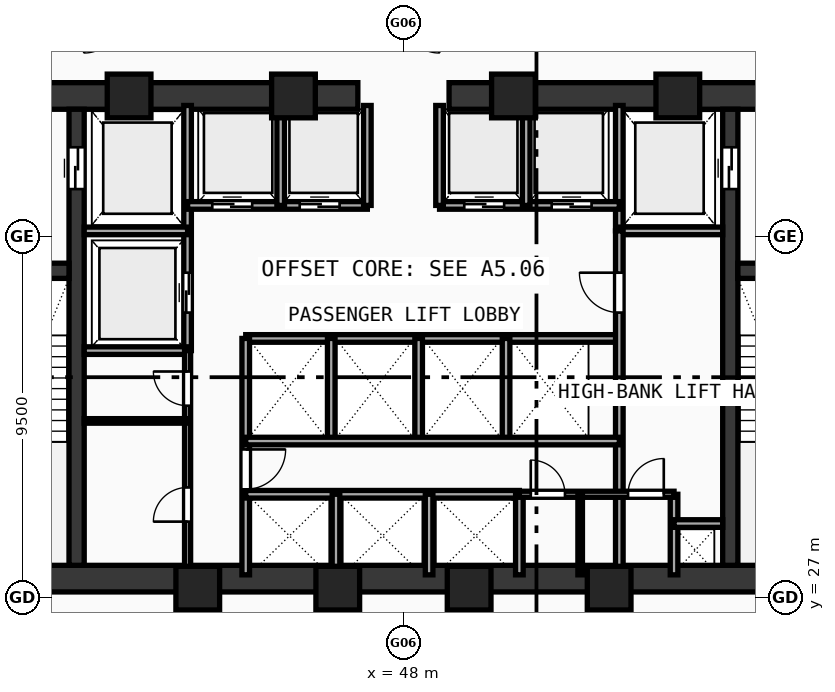
"""IFC4 building model, lengths in metres.
Left out: names, types, materials, properties, quantities, classifications, styles, units other than length and angle.
Written with IfcOpenShell. Run it as: python <this file> out.ifc"""

import sys

from ifc_helpers import new_model, si_unit, direction, frame, frame_2d, origin, origin_with_axes, origin_2d, place, context, subcontext, project, spatial, rectangle, hollow_rectangle, extrude, source, transform, mapped, element, fill, save


model = new_model("IFC4")
c1 = context("Model", 3, precision=1e-05, world=origin(), true_north=direction((0.0, 1.0)))
c2 = subcontext(c1, "Body", "Model", "MODEL_VIEW")
j1 = project(units=[si_unit("LENGTHUNIT", "METRE"), si_unit("PLANEANGLEUNIT", "RADIAN")], contexts=[c1])
p1 = place(None, origin())
s1 = spatial("IfcSite", under=j1, at=p1, CompositionType="ELEMENT")
p2 = place(p1, origin())
s2 = spatial("IfcBuilding", under=s1, at=p2, CompositionType="ELEMENT")
p3 = place(p2, frame((0.0, 0.0, 66.7)))
s3 = spatial("IfcBuildingStorey", under=s2, at=p3, CompositionType="ELEMENT", Elevation=66.7)
p4 = place(p3, frame((35.45, 27.5, 0.0), z_axis=(0.0, 0.0, 1.0), x_axis=(1.0, 0.0, 0.0)))
e1 = element("IfcWall", 1, at=p4, inside=s3, PredefinedType="SHEAR", context=c2, shape_type="SweptSolid", body=[
    extrude(rectangle(XDim=25.1, YDim=0.7, at=frame_2d((12.55, 0.0))), origin(), (0.0, 0.0, 1.0), 3.37),
])
p5 = place(p3, frame((35.45, 40.2, 0.0), z_axis=(0.0, 0.0, 1.0), x_axis=(1.0, 0.0, 0.0)))
e2 = element("IfcWall", 2, at=p5, inside=s3, PredefinedType="SHEAR", context=c2, shape_type="SweptSolid", body=[
    extrude(rectangle(XDim=11.35, YDim=0.7, at=frame_2d((5.675, 0.0))), origin(), (0.0, 0.0, 1.0), 3.37),
])
p6 = place(p5, frame((1.7, 0.0, 0.0)))
e3 = element("IfcOpeningElement", 3, at=p6, cuts=e2, PredefinedType="OPENING", context=c2, shape_type="SweptSolid", body=[
    extrude(rectangle(XDim=1.05, YDim=2.1, at=frame_2d((0.525, 1.05))), frame((0.0, 0.36, 0.0), z_axis=(0.0, -1.0, 0.0), x_axis=(1.0, 0.0, 0.0)), (0.0, 0.0, 1.0), 0.72),
])
p7 = place(p3, frame((49.2, 40.2, 0.0), z_axis=(0.0, 0.0, 1.0), x_axis=(1.0, 0.0, 0.0)))
e4 = element("IfcWall", 4, at=p7, inside=s3, PredefinedType="SHEAR", context=c2, shape_type="SweptSolid", body=[
    extrude(rectangle(XDim=11.35, YDim=0.7, at=frame_2d((5.675, 0.0))), origin(), (0.0, 0.0, 1.0), 3.37),
])
p8 = place(p7, frame((8.6, 0.0, 0.0)))
e5 = element("IfcOpeningElement", 5, at=p8, cuts=e4, PredefinedType="OPENING", context=c2, shape_type="SweptSolid", body=[
    extrude(rectangle(XDim=1.05, YDim=2.1, at=frame_2d((0.525, 1.05))), frame((0.0, 0.36, 0.0), z_axis=(0.0, -1.0, 0.0), x_axis=(1.0, 0.0, 0.0)), (0.0, 0.0, 1.0), 0.72),
])
p9 = place(p3, frame((39.4, 27.85, 0.0), z_axis=(0.0, 0.0, 1.0), x_axis=(0.0, 1.0, 0.0)))
e6 = element("IfcWall", 6, at=p9, inside=s3, PredefinedType="SHEAR", context=c2, shape_type="SweptSolid", body=[
    extrude(rectangle(XDim=12.0, YDim=0.4, at=frame_2d((6.0, 0.0))), origin(), (0.0, 0.0, 1.0), 3.37),
])
p10 = place(p9, frame((9.9, 0.0, 0.0)))
e7 = element("IfcOpeningElement", 7, at=p10, cuts=e6, PredefinedType="OPENING", context=c2, shape_type="SweptSolid", body=[
    extrude(rectangle(XDim=1.1, YDim=2.1, at=frame_2d((0.55, 1.05))), frame((0.0, 0.21, 0.0), z_axis=(0.0, -1.0, 0.0), x_axis=(1.0, 0.0, 0.0)), (0.0, 0.0, 1.0), 0.42),
])
p11 = place(p3, frame((56.6, 27.85, 0.0), z_axis=(0.0, 0.0, 1.0), x_axis=(0.0, 1.0, 0.0)))
e8 = element("IfcWall", 8, at=p11, inside=s3, PredefinedType="SHEAR", context=c2, shape_type="SweptSolid", body=[
    extrude(rectangle(XDim=12.0, YDim=0.4, at=frame_2d((6.0, 0.0))), origin(), (0.0, 0.0, 1.0), 3.37),
])
p12 = place(p11, frame((9.9, 0.0, 0.0)))
e9 = element("IfcOpeningElement", 9, at=p12, cuts=e8, PredefinedType="OPENING", context=c2, shape_type="SweptSolid", body=[
    extrude(rectangle(XDim=1.1, YDim=2.1, at=frame_2d((0.55, 1.05))), frame((0.0, 0.21, 0.0), z_axis=(0.0, -1.0, 0.0), x_axis=(1.0, 0.0, 0.0)), (0.0, 0.0, 1.0), 0.42),
])
p13 = place(p3, frame((36.15, 35.6, 0.0), z_axis=(0.0, 0.0, 1.0), x_axis=(1.0, 0.0, 0.0)))
e10 = element("IfcWall", 10, at=p13, inside=s3, PredefinedType="SHEAR", context=c2, shape_type="SweptSolid", body=[
    extrude(rectangle(XDim=3.05, YDim=0.4, at=frame_2d((1.525, 0.0))), origin(), (0.0, 0.0, 1.0), 3.37),
])
p14 = place(p13, frame((0.97, 0.0, 0.0)))
e11 = element("IfcOpeningElement", 11, at=p14, cuts=e10, PredefinedType="OPENING", context=c2, shape_type="SweptSolid", body=[
    extrude(rectangle(XDim=1.05, YDim=2.1, at=frame_2d((0.525, 1.05))), frame((0.0, 0.21, 0.0), z_axis=(0.0, -1.0, 0.0), x_axis=(1.0, 0.0, 0.0)), (0.0, 0.0, 1.0), 0.42),
])
p15 = place(p3, frame((56.8, 35.6, 0.0), z_axis=(0.0, 0.0, 1.0), x_axis=(1.0, 0.0, 0.0)))
e12 = element("IfcWall", 12, at=p15, inside=s3, PredefinedType="SHEAR", context=c2, shape_type="SweptSolid", body=[
    extrude(rectangle(XDim=3.05, YDim=0.4, at=frame_2d((1.525, 0.0))), origin(), (0.0, 0.0, 1.0), 3.37),
])
p16 = place(p15, frame((1.02, 0.0, 0.0)))
e13 = element("IfcOpeningElement", 13, at=p16, cuts=e12, PredefinedType="OPENING", context=c2, shape_type="SweptSolid", body=[
    extrude(rectangle(XDim=1.05, YDim=2.1, at=frame_2d((0.525, 1.05))), frame((0.0, 0.21, 0.0), z_axis=(0.0, -1.0, 0.0), x_axis=(1.0, 0.0, 0.0)), (0.0, 0.0, 1.0), 0.42),
])
m1 = source(origin(), c2, "Body", "SweptSolid", [
    extrude(hollow_rectangle(XDim=1.15, YDim=1.15, WallThickness=0.048, at=origin_2d()), origin(), (0.0, 0.0, 1.0), 3.63),
])
for number, where, z_axis, x_axis in (
    (14, (42.588, 27.25, -0.26), (0.0, 0.0, 1.0), (1.0, 0.0, 0.0)),
    (15, (46.272, 27.25, -0.26), (0.0, 0.0, 1.0), (1.0, 0.0, 0.0)),
    (16, (49.729, 27.25, -0.26), (0.0, 0.0, 1.0), (1.0, 0.0, 0.0)),
    (17, (53.412, 27.25, -0.26), (0.0, 0.0, 1.0), (1.0, 0.0, 0.0)),
    (18, (55.219, 40.2, -0.26), (0.0, 0.0, 1.0), (1.0, 0.0, 0.0)),
    (19, (50.894, 40.2, -0.26), (0.0, 0.0, 1.0), (1.0, 0.0, 0.0)),
    (20, (45.106, 40.2, -0.26), (0.0, 0.0, 1.0), (1.0, 0.0, 0.0)),
    (21, (40.781, 40.2, -0.26), (0.0, 0.0, 1.0), (1.0, 0.0, 0.0)),
):
    element("IfcColumn", number, at=place(p3, frame(where, z_axis=z_axis, x_axis=x_axis)), inside=s3, PredefinedType="COLUMN", context=c2, shape_type="MappedRepresentation", body=[
        mapped(m1, transform((0.0, 0.0, 0.0), scale=1.0)),
    ])
p17 = place(p3, frame((42.32, 33.5, 0.0), z_axis=(0.0, 0.0, 1.0), x_axis=(0.0, 1.0, 0.0)))
e22 = element("IfcWall", 22, at=p17, inside=s3, PredefinedType="SOLIDWALL", context=c2, shape_type="SweptSolid", body=[
    extrude(rectangle(XDim=6.45, YDim=0.2, at=frame_2d((3.225, 0.0))), origin(), (0.0, 0.0, 1.0), 3.37),
])
p18 = place(p17, frame((1.0, 0.0, 0.0)))
e23 = element("IfcOpeningElement", 23, at=p18, cuts=e22, PredefinedType="OPENING", context=c2, shape_type="SweptSolid", body=[
    extrude(rectangle(XDim=1.05, YDim=2.1, at=frame_2d((0.525, 1.05))), frame((0.0, 0.11, 0.0), z_axis=(0.0, -1.0, 0.0), x_axis=(1.0, 0.0, 0.0)), (0.0, 0.0, 1.0), 0.22),
])
for number, where, z_axis, x_axis in (
    (24, (39.6, 36.65, 0.0), (0.0, 0.0, 1.0), (1.0, 0.0, 0.0)),
    (25, (39.6, 33.5, 0.0), (0.0, 0.0, 1.0), (1.0, 0.0, 0.0)),
):
    element("IfcWall", number, at=place(p3, frame(where, z_axis=z_axis, x_axis=x_axis)), inside=s3, PredefinedType="SOLIDWALL", context=c2, shape_type="SweptSolid", body=[
        extrude(rectangle(XDim=2.72, YDim=0.2, at=frame_2d((1.36, 0.0))), origin(), (0.0, 0.0, 1.0), 3.37),
    ])
p19 = place(p3, frame((53.68, 36.65, 0.0), z_axis=(0.0, 0.0, 1.0), x_axis=(0.0, 1.0, 0.0)))
e26 = element("IfcWall", 26, at=p19, inside=s3, PredefinedType="SOLIDWALL", context=c2, shape_type="SweptSolid", body=[
    extrude(rectangle(XDim=3.3, YDim=0.2, at=frame_2d((1.65, 0.0))), origin(), (0.0, 0.0, 1.0), 3.37),
])
p20 = place(p3, frame((53.68, 36.65, 0.0), z_axis=(0.0, 0.0, 1.0), x_axis=(1.0, 0.0, 0.0)))
e27 = element("IfcWall", 27, at=p20, inside=s3, PredefinedType="SOLIDWALL", context=c2, shape_type="SweptSolid", body=[
    extrude(rectangle(XDim=2.72, YDim=0.2, at=frame_2d((1.36, 0.0))), origin(), (0.0, 0.0, 1.0), 3.37),
])
p21 = place(p3, frame((42.32, 37.32, 0.0), z_axis=(0.0, 0.0, 1.0), x_axis=(1.0, 0.0, 0.0)))
e28 = element("IfcWall", 28, at=p21, inside=s3, PredefinedType="SOLIDWALL", context=c2, shape_type="SweptSolid", body=[
    extrude(rectangle(XDim=4.73, YDim=0.2, at=frame_2d((2.365, 0.0))), origin(), (0.0, 0.0, 1.0), 3.37),
])
p22 = place(p21, frame((0.65, 0.0, 0.0)))
e29 = element("IfcOpeningElement", 29, at=p22, cuts=e28, PredefinedType="OPENING", context=c2, shape_type="SweptSolid", body=[
    extrude(rectangle(XDim=1.05, YDim=2.1, at=frame_2d((0.525, 1.05))), frame((0.0, 0.11, 0.0), z_axis=(0.0, -1.0, 0.0), x_axis=(1.0, 0.0, 0.0)), (0.0, 0.0, 1.0), 0.22),
])
p23 = place(p21, frame((2.95, 0.0, 0.0)))
e30 = element("IfcOpeningElement", 30, at=p23, cuts=e28, PredefinedType="OPENING", context=c2, shape_type="SweptSolid", body=[
    extrude(rectangle(XDim=1.05, YDim=2.1, at=frame_2d((0.525, 1.05))), frame((0.0, 0.11, 0.0), z_axis=(0.0, -1.0, 0.0), x_axis=(1.0, 0.0, 0.0)), (0.0, 0.0, 1.0), 0.22),
])
p24 = place(p3, frame((48.95, 37.32, 0.0), z_axis=(0.0, 0.0, 1.0), x_axis=(1.0, 0.0, 0.0)))
e31 = element("IfcWall", 31, at=p24, inside=s3, PredefinedType="SOLIDWALL", context=c2, shape_type="SweptSolid", body=[
    extrude(rectangle(XDim=4.73, YDim=0.2, at=frame_2d((2.365, 0.0))), origin(), (0.0, 0.0, 1.0), 3.37),
])
p25 = place(p24, frame((0.65, 0.0, 0.0)))
e32 = element("IfcOpeningElement", 32, at=p25, cuts=e31, PredefinedType="OPENING", context=c2, shape_type="SweptSolid", body=[
    extrude(rectangle(XDim=1.05, YDim=2.1, at=frame_2d((0.525, 1.05))), frame((0.0, 0.11, 0.0), z_axis=(0.0, -1.0, 0.0), x_axis=(1.0, 0.0, 0.0)), (0.0, 0.0, 1.0), 0.22),
])
p26 = place(p24, frame((2.95, 0.0, 0.0)))
e33 = element("IfcOpeningElement", 33, at=p26, cuts=e31, PredefinedType="OPENING", context=c2, shape_type="SweptSolid", body=[
    extrude(rectangle(XDim=1.05, YDim=2.1, at=frame_2d((0.525, 1.05))), frame((0.0, 0.11, 0.0), z_axis=(0.0, -1.0, 0.0), x_axis=(1.0, 0.0, 0.0)), (0.0, 0.0, 1.0), 0.22),
])
for number, where, z_axis, x_axis in (
    (34, (47.05, 37.32, 0.0), (0.0, 0.0, 1.0), (0.0, 1.0, 0.0)),
    (35, (48.95, 37.32, 0.0), (0.0, 0.0, 1.0), (0.0, 1.0, 0.0)),
    (36, (44.77, 37.32, 0.0), (0.0, 0.0, 1.0), (0.0, 1.0, 0.0)),
    (37, (51.23, 37.32, 0.0), (0.0, 0.0, 1.0), (0.0, 1.0, 0.0)),
):
    element("IfcWall", number, at=place(p3, frame(where, z_axis=z_axis, x_axis=x_axis)), inside=s3, PredefinedType="SOLIDWALL", context=c2, shape_type="SweptSolid", body=[
        extrude(rectangle(XDim=2.63, YDim=0.2, at=frame_2d((1.315, 0.0))), origin(), (0.0, 0.0, 1.0), 3.37),
    ])
p27 = place(p3, frame((43.85, 33.82, 0.0), z_axis=(0.0, 0.0, 1.0), x_axis=(1.0, 0.0, 0.0)))
e38 = element("IfcWall", 38, at=p27, inside=s3, PredefinedType="SOLIDWALL", context=c2, shape_type="SweptSolid", body=[
    extrude(rectangle(XDim=9.83, YDim=0.2, at=frame_2d((4.915, 0.0))), origin(), (0.0, 0.0, 1.0), 3.37),
])
p28 = place(p3, frame((43.85, 27.6, 0.0), z_axis=(0.0, 0.0, 1.0), x_axis=(0.0, 1.0, 0.0)))
e39 = element("IfcWall", 39, at=p28, inside=s3, PredefinedType="SOLIDWALL", context=c2, shape_type="SweptSolid", body=[
    extrude(rectangle(XDim=6.22, YDim=0.2, at=frame_2d((3.11, 0.0))), origin(), (0.0, 0.0, 1.0), 3.37),
])
p29 = place(p28, frame((2.25, 0.0, 0.0)))
e40 = element("IfcOpeningElement", 40, at=p29, cuts=e39, PredefinedType="OPENING", context=c2, shape_type="SweptSolid", body=[
    extrude(rectangle(XDim=1.05, YDim=2.1, at=frame_2d((0.525, 1.05))), frame((0.0, 0.11, 0.0), z_axis=(0.0, -1.0, 0.0), x_axis=(1.0, 0.0, 0.0)), (0.0, 0.0, 1.0), 0.22),
])
p30 = place(p3, frame((53.68, 27.6, 0.0), z_axis=(0.0, 0.0, 1.0), x_axis=(0.0, 1.0, 0.0)))
e41 = element("IfcWall", 41, at=p30, inside=s3, PredefinedType="SOLIDWALL", context=c2, shape_type="SweptSolid", body=[
    extrude(rectangle(XDim=9.05, YDim=0.2, at=frame_2d((4.525, 0.0))), origin(), (0.0, 0.0, 1.0), 3.37),
])
p31 = place(p30, frame((6.9, 0.0, 0.0)))
e42 = element("IfcOpeningElement", 42, at=p31, cuts=e41, PredefinedType="OPENING", context=c2, shape_type="SweptSolid", body=[
    extrude(rectangle(XDim=1.05, YDim=2.1, at=frame_2d((0.525, 1.05))), frame((0.0, 0.11, 0.0), z_axis=(0.0, -1.0, 0.0), x_axis=(1.0, 0.0, 0.0)), (0.0, 0.0, 1.0), 0.22),
])
for number, where, z_axis, x_axis in (
    (43, (46.1, 31.12, 0.0), (0.0, 0.0, 1.0), (0.0, 1.0, 0.0)),
    (44, (48.4, 31.12, 0.0), (0.0, 0.0, 1.0), (0.0, 1.0, 0.0)),
    (45, (50.7, 31.12, 0.0), (0.0, 0.0, 1.0), (0.0, 1.0, 0.0)),
):
    element("IfcWall", number, at=place(p3, frame(where, z_axis=z_axis, x_axis=x_axis)), inside=s3, PredefinedType="SOLIDWALL", context=c2, shape_type="SweptSolid", body=[
        extrude(rectangle(XDim=2.7, YDim=0.2, at=frame_2d((1.35, 0.0))), origin(), (0.0, 0.0, 1.0), 3.37),
    ])
p32 = place(p3, frame((43.85, 29.72, 0.0), z_axis=(0.0, 0.0, 1.0), x_axis=(1.0, 0.0, 0.0)))
e46 = element("IfcWall", 46, at=p32, inside=s3, PredefinedType="SOLIDWALL", context=c2, shape_type="SweptSolid", body=[
    extrude(rectangle(XDim=7.2, YDim=0.2, at=frame_2d((3.6, 0.0))), origin(), (0.0, 0.0, 1.0), 3.37),
])
p33 = place(p3, frame((51.05, 27.6, 0.0), z_axis=(0.0, 0.0, 1.0), x_axis=(0.0, 1.0, 0.0)))
e47 = element("IfcWall", 47, at=p33, inside=s3, PredefinedType="SOLIDWALL", context=c2, shape_type="SweptSolid", body=[
    extrude(rectangle(XDim=2.12, YDim=0.2, at=frame_2d((1.06, 0.0))), origin(), (0.0, 0.0, 1.0), 3.37),
])
p34 = place(p3, frame((43.85, 31.12, 0.0), z_axis=(0.0, 0.0, 1.0), x_axis=(1.0, 0.0, 0.0)))
e48 = element("IfcWall", 48, at=p34, inside=s3, PredefinedType="SOLIDWALL", context=c2, shape_type="SweptSolid", body=[
    extrude(rectangle(XDim=9.83, YDim=0.2, at=frame_2d((4.915, 0.0))), origin(), (0.0, 0.0, 1.0), 3.37),
])
for number, where, z_axis, x_axis in (
    (49, (46.225, 27.6, 0.0), (0.0, 0.0, 1.0), (0.0, 1.0, 0.0)),
    (50, (48.675, 27.6, 0.0), (0.0, 0.0, 1.0), (0.0, 1.0, 0.0)),
    (51, (55.12, 27.6, 0.0), (0.0, 0.0, 1.0), (0.0, 1.0, 0.0)),
):
    element("IfcWall", number, at=place(p3, frame(where, z_axis=z_axis, x_axis=x_axis)), inside=s3, PredefinedType="SOLIDWALL", context=c2, shape_type="SweptSolid", body=[
        extrude(rectangle(XDim=2.12, YDim=0.2, at=frame_2d((1.06, 0.0))), origin(), (0.0, 0.0, 1.0), 3.37),
    ])
p35 = place(p3, frame((55.12, 28.95, 0.0), z_axis=(0.0, 0.0, 1.0), x_axis=(1.0, 0.0, 0.0)))
e52 = element("IfcWall", 52, at=p35, inside=s3, PredefinedType="SOLIDWALL", context=c2, shape_type="SweptSolid", body=[
    extrude(rectangle(XDim=1.28, YDim=0.2, at=frame_2d((0.64, 0.0))), origin(), (0.0, 0.0, 1.0), 3.37),
])
p36 = place(p3, frame((42.32, 27.6, 0.0), z_axis=(0.0, 0.0, 1.0), x_axis=(0.0, 1.0, 0.0)))
e53 = element("IfcWall", 53, at=p36, inside=s3, PredefinedType="PARTITIONING", context=c2, shape_type="SweptSolid", body=[
    extrude(rectangle(XDim=5.9, YDim=0.16, at=frame_2d((2.95, 0.0))), origin(), (0.0, 0.0, 1.0), 3.37),
])
p37 = place(p36, frame((1.4, 0.0, 0.0)))
e54 = element("IfcOpeningElement", 54, at=p37, cuts=e53, PredefinedType="OPENING", context=c2, shape_type="SweptSolid", body=[
    extrude(rectangle(XDim=0.9, YDim=2.1, at=frame_2d((0.45, 1.05))), frame((0.0, 0.09, 0.0), z_axis=(0.0, -1.0, 0.0), x_axis=(1.0, 0.0, 0.0)), (0.0, 0.0, 1.0), 0.18),
])
p38 = place(p36, frame((4.45, 0.0, 0.0)))
e55 = element("IfcOpeningElement", 55, at=p38, cuts=e53, PredefinedType="OPENING", context=c2, shape_type="SweptSolid", body=[
    extrude(rectangle(XDim=0.9, YDim=2.1, at=frame_2d((0.45, 1.05))), frame((0.0, 0.09, 0.0), z_axis=(0.0, -1.0, 0.0), x_axis=(1.0, 0.0, 0.0)), (0.0, 0.0, 1.0), 0.18),
])
p39 = place(p3, frame((51.05, 29.72, 0.0), z_axis=(0.0, 0.0, 1.0), x_axis=(1.0, 0.0, 0.0)))
e56 = element("IfcWall", 56, at=p39, inside=s3, PredefinedType="PARTITIONING", context=c2, shape_type="SweptSolid", body=[
    extrude(rectangle(XDim=4.07, YDim=0.16, at=frame_2d((2.035, 0.0))), origin(), (0.0, 0.0, 1.0), 3.37),
])
p40 = place(p39, frame((0.3, 0.0, 0.0)))
e57 = element("IfcOpeningElement", 57, at=p40, cuts=e56, PredefinedType="OPENING", context=c2, shape_type="SweptSolid", body=[
    extrude(rectangle(XDim=0.9, YDim=2.1, at=frame_2d((0.45, 1.05))), frame((0.0, 0.09, 0.0), z_axis=(0.0, -1.0, 0.0), x_axis=(1.0, 0.0, 0.0)), (0.0, 0.0, 1.0), 0.18),
])
p41 = place(p39, frame((2.86, 0.0, 0.0)))
e58 = element("IfcOpeningElement", 58, at=p41, cuts=e56, PredefinedType="OPENING", context=c2, shape_type="SweptSolid", body=[
    extrude(rectangle(XDim=0.94, YDim=2.1, at=frame_2d((0.47, 1.05))), frame((0.0, 0.09, 0.0), z_axis=(0.0, -1.0, 0.0), x_axis=(1.0, 0.0, 0.0)), (0.0, 0.0, 1.0), 0.18),
])
p42 = place(p3, frame((39.6, 31.65, 0.0), z_axis=(0.0, 0.0, 1.0), x_axis=(1.0, 0.0, 0.0)))
e59 = element("IfcWall", 59, at=p42, inside=s3, PredefinedType="PARTITIONING", context=c2, shape_type="SweptSolid", body=[
    extrude(rectangle(XDim=2.72, YDim=0.12, at=frame_2d((1.36, 0.0))), origin(), (0.0, 0.0, 1.0), 3.37),
])
p43 = place(p3, frame((52.65, 27.6, 0.0), z_axis=(0.0, 0.0, 1.0), x_axis=(0.0, 1.0, 0.0)))
e60 = element("IfcWall", 60, at=p43, inside=s3, PredefinedType="PARTITIONING", context=c2, shape_type="SweptSolid", body=[
    extrude(rectangle(XDim=2.12, YDim=0.12, at=frame_2d((1.06, 0.0))), origin(), (0.0, 0.0, 1.0), 3.37),
])
m2 = source(origin(), c2, "Body", "SweptSolid", [
    extrude(rectangle(XDim=1.1, YDim=2.1, at=frame_2d((0.55, 1.05))), frame((0.0, 0.025, 0.0), z_axis=(0.0, -1.0, 0.0), x_axis=(1.0, 0.0, 0.0)), (0.0, 0.0, 1.0), 0.05),
])
p44 = place(p10, frame((1.1, 0.0, 0.0), z_axis=(0.0, 0.0, 1.0), x_axis=(-1.0, 0.0, 0.0)))
e61 = element("IfcDoor", 61, at=p44, inside=s3, OperationType="DOUBLE_DOOR_SLIDING", PredefinedType="DOOR", context=c2, shape_type="MappedRepresentation", body=[
    mapped(m2, transform((0.0, 0.0, 0.0), scale=1.0)),
])
fill(e7, e61)
p45 = place(p12, origin_with_axes())
e62 = element("IfcDoor", 62, at=p45, inside=s3, OperationType="DOUBLE_DOOR_SLIDING", PredefinedType="DOOR", context=c2, shape_type="MappedRepresentation", body=[
    mapped(m2, transform((0.0, 0.0, 0.0), scale=1.0)),
])
fill(e9, e62)
m3 = source(origin(), c2, "Body", "SweptSolid", [
    extrude(rectangle(XDim=1.05, YDim=2.1, at=frame_2d((0.525, 1.05))), frame((0.0, 0.025, 0.0), z_axis=(0.0, -1.0, 0.0), x_axis=(1.0, 0.0, 0.0)), (0.0, 0.0, 1.0), 0.05),
])
p46 = place(p18, origin_with_axes())
e63 = element("IfcDoor", 63, at=p46, inside=s3, OperationType="DOUBLE_DOOR_SLIDING", PredefinedType="DOOR", context=c2, shape_type="MappedRepresentation", body=[
    mapped(m3, transform((0.0, 0.0, 0.0), scale=1.0)),
])
fill(e23, e63)
p47 = place(p22, frame((1.05, 0.0, 0.0), z_axis=(0.0, 0.0, 1.0), x_axis=(-1.0, 0.0, 0.0)))
e64 = element("IfcDoor", 64, at=p47, inside=s3, OperationType="DOUBLE_DOOR_SLIDING", PredefinedType="DOOR", context=c2, shape_type="MappedRepresentation", body=[
    mapped(m3, transform((0.0, 0.0, 0.0), scale=1.0)),
])
fill(e29, e64)
p48 = place(p23, frame((1.05, 0.0, 0.0), z_axis=(0.0, 0.0, 1.0), x_axis=(-1.0, 0.0, 0.0)))
e65 = element("IfcDoor", 65, at=p48, inside=s3, OperationType="DOUBLE_DOOR_SLIDING", PredefinedType="DOOR", context=c2, shape_type="MappedRepresentation", body=[
    mapped(m3, transform((0.0, 0.0, 0.0), scale=1.0)),
])
fill(e30, e65)
p49 = place(p25, frame((1.05, 0.0, 0.0), z_axis=(0.0, 0.0, 1.0), x_axis=(-1.0, 0.0, 0.0)))
e66 = element("IfcDoor", 66, at=p49, inside=s3, OperationType="DOUBLE_DOOR_SLIDING", PredefinedType="DOOR", context=c2, shape_type="MappedRepresentation", body=[
    mapped(m3, transform((0.0, 0.0, 0.0), scale=1.0)),
])
fill(e32, e66)
p50 = place(p26, frame((1.05, 0.0, 0.0), z_axis=(0.0, 0.0, 1.0), x_axis=(-1.0, 0.0, 0.0)))
e67 = element("IfcDoor", 67, at=p50, inside=s3, OperationType="DOUBLE_DOOR_SLIDING", PredefinedType="DOOR", context=c2, shape_type="MappedRepresentation", body=[
    mapped(m3, transform((0.0, 0.0, 0.0), scale=1.0)),
])
fill(e33, e67)
p51 = place(p29, frame((1.05, 0.0, 0.0), z_axis=(0.0, 0.0, 1.0), x_axis=(-1.0, 0.0, 0.0)))
e68 = element("IfcDoor", 68, at=p51, inside=s3, OperationType="SINGLE_SWING_LEFT", PredefinedType="DOOR", context=c2, shape_type="MappedRepresentation", body=[
    mapped(m3, transform((0.0, 0.0, 0.0), scale=1.0)),
])
fill(e40, e68)
p52 = place(p31, origin_with_axes())
e69 = element("IfcDoor", 69, at=p52, inside=s3, OperationType="SINGLE_SWING_RIGHT", PredefinedType="DOOR", context=c2, shape_type="MappedRepresentation", body=[
    mapped(m3, transform((0.0, 0.0, 0.0), scale=1.0)),
])
fill(e42, e69)
m4 = source(origin(), c2, "Body", "SweptSolid", [
    extrude(rectangle(XDim=0.9, YDim=2.1, at=frame_2d((0.45, 1.05))), frame((0.0, 0.025, 0.0), z_axis=(0.0, -1.0, 0.0), x_axis=(1.0, 0.0, 0.0)), (0.0, 0.0, 1.0), 0.05),
])
p53 = place(p37, origin_with_axes())
e70 = element("IfcDoor", 70, at=p53, inside=s3, OperationType="SINGLE_SWING_LEFT", PredefinedType="DOOR", context=c2, shape_type="MappedRepresentation", body=[
    mapped(m4, transform((0.0, 0.0, 0.0), scale=1.0)),
])
fill(e54, e70)
p54 = place(p38, origin_with_axes())
e71 = element("IfcDoor", 71, at=p54, inside=s3, OperationType="SINGLE_SWING_RIGHT", PredefinedType="DOOR", context=c2, shape_type="MappedRepresentation", body=[
    mapped(m4, transform((0.0, 0.0, 0.0), scale=1.0)),
])
fill(e55, e71)
p55 = place(p40, origin_with_axes())
e72 = element("IfcDoor", 72, at=p55, inside=s3, OperationType="SINGLE_SWING_LEFT", PredefinedType="DOOR", context=c2, shape_type="MappedRepresentation", body=[
    mapped(m4, transform((0.0, 0.0, 0.0), scale=1.0)),
])
fill(e57, e72)
m5 = source(origin(), c2, "Body", "SweptSolid", [
    extrude(rectangle(XDim=0.94, YDim=2.1, at=frame_2d((0.47, 1.05))), frame((0.0, 0.025, 0.0), z_axis=(0.0, -1.0, 0.0), x_axis=(1.0, 0.0, 0.0)), (0.0, 0.0, 1.0), 0.05),
])
p56 = place(p41, origin_with_axes())
e73 = element("IfcDoor", 73, at=p56, inside=s3, OperationType="SINGLE_SWING_RIGHT", PredefinedType="DOOR", context=c2, shape_type="MappedRepresentation", body=[
    mapped(m5, transform((0.0, 0.0, 0.0), scale=1.0)),
])
fill(e58, e73)
save(model, sys.argv[1])
